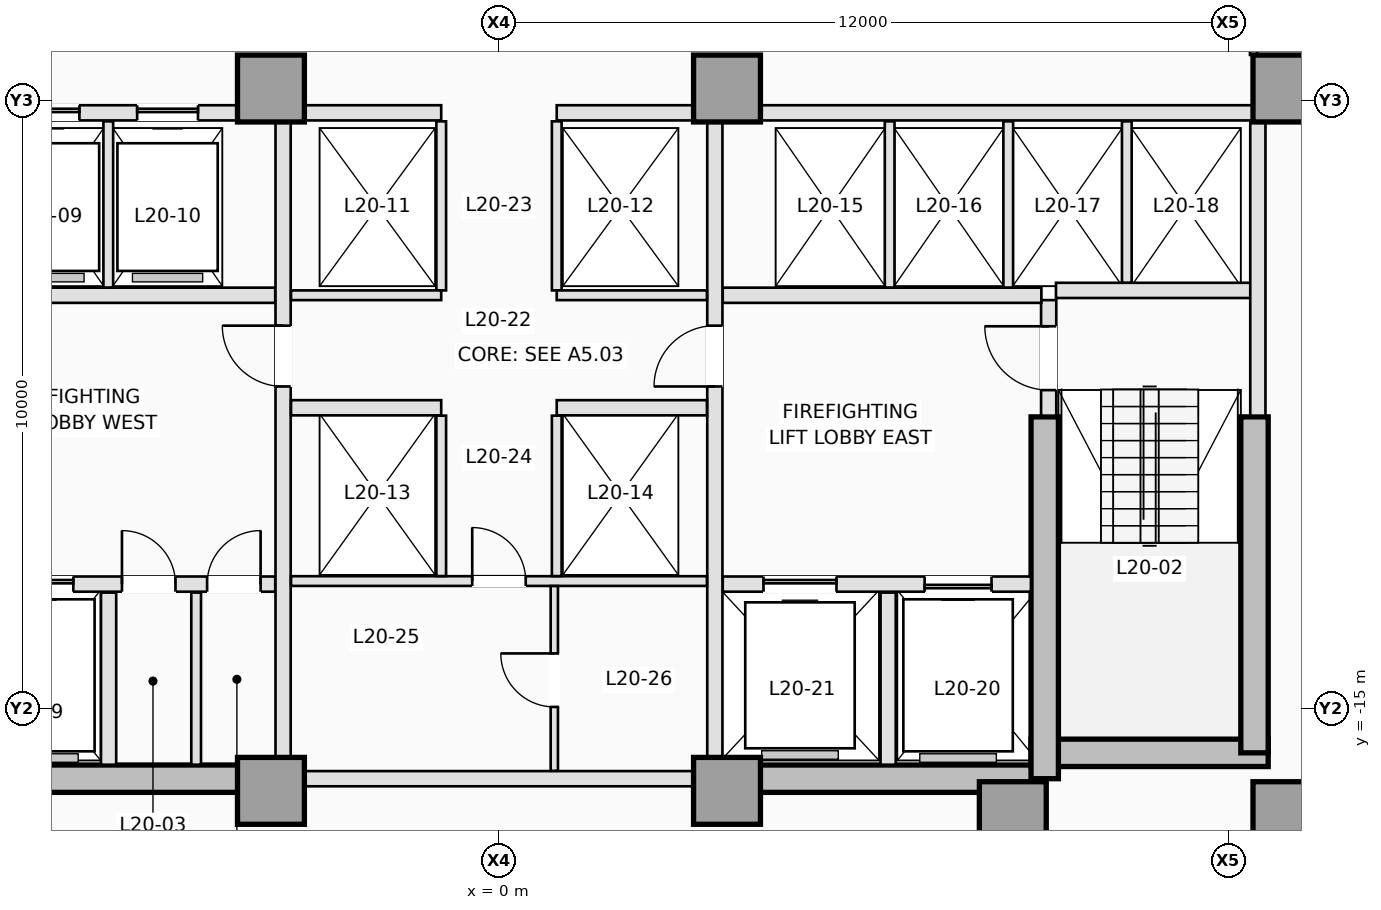
"""IFC4 building model, lengths in metres.
Left out: names, types, materials, properties, quantities, classifications, styles, units other than length and angle.
Written with IfcOpenShell. Run it as: python <this file> out.ifc"""

import sys

from ifc_helpers import new_model, si_unit, direction, frame, frame_2d, origin, origin_2d, place, context, subcontext, project, spatial, rectangle, extrude, element, fill, save


model = new_model("IFC4")
c1 = context("Model", 3, precision=1e-05, world=origin(), true_north=direction((0.0, 1.0)))
c2 = subcontext(c1, "Body", "Model", "MODEL_VIEW")
j1 = project(units=[si_unit("LENGTHUNIT", "METRE"), si_unit("PLANEANGLEUNIT", "RADIAN")], contexts=[c1])
p1 = place(None, origin())
s1 = spatial("IfcSite", under=j1, at=p1, CompositionType="ELEMENT")
p2 = place(p1, origin())
s2 = spatial("IfcBuilding", under=s1, at=p2, CompositionType="ELEMENT")
p3 = place(p2, frame((0.0, 0.0, 76.6)))
s3 = spatial("IfcBuildingStorey", under=s2, at=p3, CompositionType="ELEMENT", Elevation=76.6)
for number, where, z_axis, x_axis in (
    (1, (-8.975, -16.15, 0.0), (0.0, 0.0, 1.0), (1.0, 0.0, 0.0)),
    (2, (3.75, -16.15, 0.0), (0.0, 0.0, 1.0), (1.0, 0.0, 0.0)),
):
    element("IfcWall", number, at=place(p3, frame(where, z_axis=z_axis, x_axis=x_axis)), inside=s3, PredefinedType="SHEAR", context=c2, shape_type="SweptSolid", body=[
        extrude(rectangle(XDim=5.225, YDim=0.45, at=frame_2d((2.613, 0.0))), origin(), (0.0, 0.0, 1.0), 3.5),
    ])
p4 = place(p3, frame((8.75, -15.725, 0.0), z_axis=(0.0, 0.0, 1.0), x_axis=(1.0, 0.0, 0.0)))
e3 = element("IfcWall", 3, at=p4, inside=s3, PredefinedType="SHEAR", context=c2, shape_type="SweptSolid", body=[
    extrude(rectangle(XDim=3.9, YDim=0.45, at=frame_2d((1.95, 0.0))), origin(), (0.0, 0.0, 1.0), 3.5),
])
p5 = place(p3, frame((12.425, -15.725, 0.0), z_axis=(0.0, 0.0, 1.0), x_axis=(0.0, 1.0, 0.0)))
e4 = element("IfcWall", 4, at=p5, inside=s3, PredefinedType="SHEAR", context=c2, shape_type="SweptSolid", body=[
    extrude(rectangle(XDim=5.525, YDim=0.45, at=frame_2d((2.763, 0.0))), origin(), (0.0, 0.0, 1.0), 3.5),
])
p6 = place(p3, frame((8.975, -16.15, 0.0), z_axis=(0.0, 0.0, 1.0), x_axis=(0.0, 1.0, 0.0)))
e5 = element("IfcWall", 5, at=p6, inside=s3, PredefinedType="SHEAR", context=c2, shape_type="SweptSolid", body=[
    extrude(rectangle(XDim=5.95, YDim=0.45, at=frame_2d((2.975, 0.0))), origin(), (0.0, 0.0, 1.0), 3.5),
])
for number, where, z_axis, x_axis in (
    (6, (-3.75, -16.35, 0.0), (0.0, 0.0, 1.0), (1.0, 0.0, 0.0)),
    (7, (3.75, -16.35, 0.0), (0.0, 0.0, 1.0), (1.0, 0.0, 0.0)),
    (8, (8.45, -16.75, 0.0), (0.0, 0.0, 1.0), (1.0, 0.0, 0.0)),
    (9, (12.95, -16.75, 0.0), (0.0, 0.0, 1.0), (1.0, 0.0, 0.0)),
    (10, (-3.75, -4.8, 0.0), (0.0, 0.0, 1.0), (1.0, 0.0, 0.0)),
    (11, (3.75, -4.8, 0.0), (0.0, 0.0, 1.0), (1.0, 0.0, 0.0)),
    (12, (12.95, -4.8, 0.0), (0.0, 0.0, 1.0), (1.0, 0.0, 0.0)),
):
    element("IfcColumn", number, at=place(p3, frame(where, z_axis=z_axis, x_axis=x_axis)), inside=s3, PredefinedType="COLUMN", context=c2, shape_type="SweptSolid", body=[
        extrude(rectangle(XDim=1.1, YDim=1.1, at=origin_2d()), origin(), (0.0, 0.0, 1.0), 3.5),
    ])
p7 = place(p3, frame((9.04, -10.18, 0.0), z_axis=(0.0, 0.0, 1.0), x_axis=(0.0, 1.0, 0.0)))
e13 = element("IfcWall", 13, at=p7, inside=s3, PredefinedType="PARTITIONING", context=c2, shape_type="SweptSolid", body=[
    extrude(rectangle(XDim=1.9, YDim=0.25, at=frame_2d((0.95, 0.0))), origin(), (0.0, 0.0, 1.0), 3.25),
])
p8 = place(p7, frame((0.42, 0.0, 0.0)))
e14 = element("IfcOpeningElement", 14, at=p8, cuts=e13, PredefinedType="OPENING", context=c2, shape_type="SweptSolid", body=[
    extrude(rectangle(XDim=1.05, YDim=2.15, at=frame_2d((0.525, 1.075))), frame((0.0, 0.135, 0.0), z_axis=(0.0, -1.0, 0.0), x_axis=(1.0, 0.0, 0.0)), (0.0, 0.0, 1.0), 0.27),
])
p9 = place(p3, frame((9.16, -8.12, 0.0), z_axis=(0.0, 0.0, 1.0), x_axis=(1.0, 0.0, 0.0)))
e15 = element("IfcWall", 15, at=p9, inside=s3, PredefinedType="PARTITIONING", context=c2, shape_type="SweptSolid", body=[
    extrude(rectangle(XDim=3.22, YDim=0.25, at=frame_2d((1.61, 0.0))), origin(), (0.0, 0.0, 1.0), 3.25),
])
p10 = place(p3, frame((12.48, -10.18, 0.0), z_axis=(0.0, 0.0, 1.0), x_axis=(0.0, 1.0, 0.0)))
e16 = element("IfcWall", 16, at=p10, inside=s3, PredefinedType="PARTITIONING", context=c2, shape_type="SweptSolid", body=[
    extrude(rectangle(XDim=4.828, YDim=0.25, at=frame_2d((2.414, 0.0))), origin(), (0.0, 0.0, 1.0), 3.25),
])
p11 = place(p3, frame((-8.748, -12.95, 0.0), z_axis=(0.0, 0.0, 1.0), x_axis=(1.0, 0.0, 0.0)))
e17 = element("IfcWall", 17, at=p11, inside=s3, PredefinedType="PARTITIONING", context=c2, shape_type="SweptSolid", body=[
    extrude(rectangle(XDim=5.068, YDim=0.25, at=frame_2d((2.534, 0.0))), origin(), (0.0, 0.0, 1.0), 3.25),
])
p12 = place(p11, frame((0.648, 0.0, 0.0)))
e18 = element("IfcOpeningElement", 18, at=p12, cuts=e17, PredefinedType="OPENING", context=c2, shape_type="SweptSolid", body=[
    extrude(rectangle(XDim=1.1, YDim=2.15, at=frame_2d((0.55, 1.075))), frame((0.0, 0.135, 0.0), z_axis=(0.0, -1.0, 0.0), x_axis=(1.0, 0.0, 0.0)), (0.0, 0.0, 1.0), 0.27),
])
p13 = place(p11, frame((2.548, 0.0, 0.0)))
e19 = element("IfcOpeningElement", 19, at=p13, cuts=e17, PredefinedType="OPENING", context=c2, shape_type="SweptSolid", body=[
    extrude(rectangle(XDim=0.88, YDim=2.1, at=frame_2d((0.44, 1.05))), frame((0.0, 0.135, 0.0), z_axis=(0.0, -1.0, 0.0), x_axis=(1.0, 0.0, 0.0)), (0.0, 0.0, 1.0), 0.27),
])
p14 = place(p11, frame((3.948, 0.0, 0.0)))
e20 = element("IfcOpeningElement", 20, at=p14, cuts=e17, PredefinedType="OPENING", context=c2, shape_type="SweptSolid", body=[
    extrude(rectangle(XDim=0.88, YDim=2.1, at=frame_2d((0.44, 1.05))), frame((0.0, 0.135, 0.0), z_axis=(0.0, -1.0, 0.0), x_axis=(1.0, 0.0, 0.0)), (0.0, 0.0, 1.0), 0.27),
])
p15 = place(p3, frame((3.68, -12.95, 0.0), z_axis=(0.0, 0.0, 1.0), x_axis=(1.0, 0.0, 0.0)))
e21 = element("IfcWall", 21, at=p15, inside=s3, PredefinedType="PARTITIONING", context=c2, shape_type="SweptSolid", body=[
    extrude(rectangle(XDim=5.068, YDim=0.25, at=frame_2d((2.534, 0.0))), origin(), (0.0, 0.0, 1.0), 3.25),
])
p16 = place(p15, frame((3.32, 0.0, 0.0)))
e22 = element("IfcOpeningElement", 22, at=p16, cuts=e21, PredefinedType="OPENING", context=c2, shape_type="SweptSolid", body=[
    extrude(rectangle(XDim=1.1, YDim=2.15, at=frame_2d((0.55, 1.075))), frame((0.0, 0.135, 0.0), z_axis=(0.0, -1.0, 0.0), x_axis=(1.0, 0.0, 0.0)), (0.0, 0.0, 1.0), 0.27),
])
p17 = place(p15, frame((0.67, 0.0, 0.0)))
e23 = element("IfcOpeningElement", 23, at=p17, cuts=e21, PredefinedType="OPENING", context=c2, shape_type="SweptSolid", body=[
    extrude(rectangle(XDim=1.2, YDim=2.15, at=frame_2d((0.6, 1.075))), frame((0.0, 0.135, 0.0), z_axis=(0.0, -1.0, 0.0), x_axis=(1.0, 0.0, 0.0)), (0.0, 0.0, 1.0), 0.27),
])
p18 = place(p3, frame((-6.42, -15.92, 0.0), z_axis=(0.0, 0.0, 1.0), x_axis=(0.0, 1.0, 0.0)))
e24 = element("IfcWall", 24, at=p18, inside=s3, PredefinedType="PARTITIONING", context=c2, shape_type="SweptSolid", body=[
    extrude(rectangle(XDim=2.83, YDim=0.25, at=frame_2d((1.415, 0.0))), origin(), (0.0, 0.0, 1.0), 3.25),
])
p19 = place(p3, frame((-4.98, -15.92, 0.0), z_axis=(0.0, 0.0, 1.0), x_axis=(0.0, 1.0, 0.0)))
e25 = element("IfcWall", 25, at=p19, inside=s3, PredefinedType="PARTITIONING", context=c2, shape_type="SweptSolid", body=[
    extrude(rectangle(XDim=2.83, YDim=0.16, at=frame_2d((1.415, 0.0))), origin(), (0.0, 0.0, 1.0), 3.25),
])
p20 = place(p3, frame((6.4, -15.92, 0.0), z_axis=(0.0, 0.0, 1.0), x_axis=(0.0, 1.0, 0.0)))
e26 = element("IfcWall", 26, at=p20, inside=s3, PredefinedType="PARTITIONING", context=c2, shape_type="SweptSolid", body=[
    extrude(rectangle(XDim=2.83, YDim=0.25, at=frame_2d((1.415, 0.0))), origin(), (0.0, 0.0, 1.0), 3.25),
])
for number, where, z_axis, x_axis in (
    (27, (-8.92, -8.2, 0.0), (0.0, 0.0, 1.0), (1.0, 0.0, 0.0)),
    (28, (3.68, -8.2, 0.0), (0.0, 0.0, 1.0), (1.0, 0.0, 0.0)),
):
    element("IfcWall", number, at=place(p3, frame(where, z_axis=z_axis, x_axis=x_axis)), inside=s3, PredefinedType="PARTITIONING", context=c2, shape_type="SweptSolid", body=[
        extrude(rectangle(XDim=5.24, YDim=0.25, at=frame_2d((2.62, 0.0))), origin(), (0.0, 0.0, 1.0), 3.25),
    ])
p21 = place(p3, frame((-3.55, -15.798, 0.0), z_axis=(0.0, 0.0, 1.0), x_axis=(0.0, 1.0, 0.0)))
e29 = element("IfcWall", 29, at=p21, inside=s3, PredefinedType="PARTITIONING", context=c2, shape_type="SweptSolid", body=[
    extrude(rectangle(XDim=10.446, YDim=0.25, at=frame_2d((5.223, 0.0))), origin(), (0.0, 0.0, 1.0), 3.25),
])
p22 = place(p21, frame((6.098, 0.0, 0.0)))
e30 = element("IfcOpeningElement", 30, at=p22, cuts=e29, PredefinedType="OPENING", context=c2, shape_type="SweptSolid", body=[
    extrude(rectangle(XDim=1.0, YDim=2.15, at=frame_2d((0.5, 1.075))), frame((0.0, 0.135, 0.0), z_axis=(0.0, -1.0, 0.0), x_axis=(1.0, 0.0, 0.0)), (0.0, 0.0, 1.0), 0.27),
])
p23 = place(p3, frame((3.55, -15.798, 0.0), z_axis=(0.0, 0.0, 1.0), x_axis=(0.0, 1.0, 0.0)))
e31 = element("IfcWall", 31, at=p23, inside=s3, PredefinedType="PARTITIONING", context=c2, shape_type="SweptSolid", body=[
    extrude(rectangle(XDim=10.446, YDim=0.25, at=frame_2d((5.223, 0.0))), origin(), (0.0, 0.0, 1.0), 3.25),
])
p24 = place(p23, frame((6.098, 0.0, 0.0)))
e32 = element("IfcOpeningElement", 32, at=p24, cuts=e31, PredefinedType="OPENING", context=c2, shape_type="SweptSolid", body=[
    extrude(rectangle(XDim=1.0, YDim=2.15, at=frame_2d((0.5, 1.075))), frame((0.0, 0.135, 0.0), z_axis=(0.0, -1.0, 0.0), x_axis=(1.0, 0.0, 0.0)), (0.0, 0.0, 1.0), 0.27),
])
p25 = place(p3, frame((-12.398, -5.2, 0.0), z_axis=(0.0, 0.0, 1.0), x_axis=(1.0, 0.0, 0.0)))
e33 = element("IfcWall", 33, at=p25, inside=s3, PredefinedType="PARTITIONING", context=c2, shape_type="SweptSolid", body=[
    extrude(rectangle(XDim=8.096, YDim=0.25, at=frame_2d((4.048, 0.0))), origin(), (0.0, 0.0, 1.0), 3.25),
])
p26 = place(p25, frame((0.598, 0.0, 0.0)))
e34 = element("IfcOpeningElement", 34, at=p26, cuts=e33, PredefinedType="OPENING", context=c2, shape_type="SweptSolid", body=[
    extrude(rectangle(XDim=1.0, YDim=2.15, at=frame_2d((0.5, 1.075))), frame((0.0, 0.135, 0.0), z_axis=(0.0, -1.0, 0.0), x_axis=(1.0, 0.0, 0.0)), (0.0, 0.0, 1.0), 0.27),
])
p27 = place(p25, frame((2.548, 0.0, 0.0)))
e35 = element("IfcOpeningElement", 35, at=p27, cuts=e33, PredefinedType="OPENING", context=c2, shape_type="SweptSolid", body=[
    extrude(rectangle(XDim=1.0, YDim=2.15, at=frame_2d((0.5, 1.075))), frame((0.0, 0.135, 0.0), z_axis=(0.0, -1.0, 0.0), x_axis=(1.0, 0.0, 0.0)), (0.0, 0.0, 1.0), 0.27),
])
p28 = place(p25, frame((4.498, 0.0, 0.0)))
e36 = element("IfcOpeningElement", 36, at=p28, cuts=e33, PredefinedType="OPENING", context=c2, shape_type="SweptSolid", body=[
    extrude(rectangle(XDim=1.0, YDim=2.15, at=frame_2d((0.5, 1.075))), frame((0.0, 0.135, 0.0), z_axis=(0.0, -1.0, 0.0), x_axis=(1.0, 0.0, 0.0)), (0.0, 0.0, 1.0), 0.27),
])
p29 = place(p25, frame((6.448, 0.0, 0.0)))
e37 = element("IfcOpeningElement", 37, at=p29, cuts=e33, PredefinedType="OPENING", context=c2, shape_type="SweptSolid", body=[
    extrude(rectangle(XDim=1.0, YDim=2.15, at=frame_2d((0.5, 1.075))), frame((0.0, 0.135, 0.0), z_axis=(0.0, -1.0, 0.0), x_axis=(1.0, 0.0, 0.0)), (0.0, 0.0, 1.0), 0.27),
])
p30 = place(p3, frame((4.302, -5.2, 0.0), z_axis=(0.0, 0.0, 1.0), x_axis=(1.0, 0.0, 0.0)))
e38 = element("IfcWall", 38, at=p30, inside=s3, PredefinedType="PARTITIONING", context=c2, shape_type="SweptSolid", body=[
    extrude(rectangle(XDim=8.096, YDim=0.25, at=frame_2d((4.048, 0.0))), origin(), (0.0, 0.0, 1.0), 3.25),
])
for number, where, z_axis, x_axis in (
    (39, (-3.198, -5.2, 0.0), (0.0, 0.0, 1.0), (1.0, 0.0, 0.0)),
    (40, (0.95, -5.2, 0.0), (0.0, 0.0, 1.0), (1.0, 0.0, 0.0)),
):
    element("IfcWall", number, at=place(p3, frame(where, z_axis=z_axis, x_axis=x_axis)), inside=s3, PredefinedType="PARTITIONING", context=c2, shape_type="SweptSolid", body=[
        extrude(rectangle(XDim=2.248, YDim=0.25, at=frame_2d((1.124, 0.0))), origin(), (0.0, 0.0, 1.0), 3.25),
    ])
for number, where, z_axis, x_axis in (
    (41, (-6.425, -8.073, 0.0), (0.0, 0.0, 1.0), (0.0, 1.0, 0.0)),
    (42, (6.425, -8.073, 0.0), (0.0, 0.0, 1.0), (0.0, 1.0, 0.0)),
    (43, (8.375, -8.073, 0.0), (0.0, 0.0, 1.0), (0.0, 1.0, 0.0)),
):
    element("IfcWall", number, at=place(p3, frame(where, z_axis=z_axis, x_axis=x_axis)), inside=s3, PredefinedType="PARTITIONING", context=c2, shape_type="SweptSolid", body=[
        extrude(rectangle(XDim=2.733, YDim=0.16, at=frame_2d((1.366, 0.0))), origin(), (0.0, 0.0, 1.0), 3.25),
    ])
p31 = place(p3, frame((10.325, -7.993, 0.0), z_axis=(0.0, 0.0, 1.0), x_axis=(0.0, 1.0, 0.0)))
e44 = element("IfcWall", 44, at=p31, inside=s3, PredefinedType="PARTITIONING", context=c2, shape_type="SweptSolid", body=[
    extrude(rectangle(XDim=2.653, YDim=0.16, at=frame_2d((1.326, 0.0))), origin(), (0.0, 0.0, 1.0), 3.25),
])
p32 = place(p3, frame((-3.198, -16.15, 0.0), z_axis=(0.0, 0.0, 1.0), x_axis=(1.0, 0.0, 0.0)))
e45 = element("IfcWall", 45, at=p32, inside=s3, PredefinedType="PARTITIONING", context=c2, shape_type="SweptSolid", body=[
    extrude(rectangle(XDim=6.396, YDim=0.25, at=frame_2d((3.198, 0.0))), origin(), (0.0, 0.0, 1.0), 2.3),
])
for number, where, z_axis, x_axis in (
    (46, (-0.95, -8.12, 0.0), (0.0, 0.0, 1.0), (0.0, 1.0, 0.0)),
    (47, (0.95, -8.12, 0.0), (0.0, 0.0, 1.0), (0.0, 1.0, 0.0)),
):
    element("IfcWall", number, at=place(p3, frame(where, z_axis=z_axis, x_axis=x_axis)), inside=s3, PredefinedType="PARTITIONING", context=c2, shape_type="SweptSolid", body=[
        extrude(rectangle(XDim=2.78, YDim=0.16, at=frame_2d((1.39, 0.0))), origin(), (0.0, 0.0, 1.0), 3.25),
    ])
for number, where, z_axis, x_axis in (
    (48, (-3.42, -8.2, 0.0), (0.0, 0.0, 1.0), (1.0, 0.0, 0.0)),
    (49, (0.95, -8.2, 0.0), (0.0, 0.0, 1.0), (1.0, 0.0, 0.0)),
):
    element("IfcWall", number, at=place(p3, frame(where, z_axis=z_axis, x_axis=x_axis)), inside=s3, PredefinedType="PARTITIONING", context=c2, shape_type="SweptSolid", body=[
        extrude(rectangle(XDim=2.47, YDim=0.16, at=frame_2d((1.235, 0.0))), origin(), (0.0, 0.0, 1.0), 3.25),
    ])
for number, where, z_axis, x_axis in (
    (50, (-3.42, -10.05, 0.0), (0.0, 0.0, 1.0), (1.0, 0.0, 0.0)),
    (51, (0.95, -10.05, 0.0), (0.0, 0.0, 1.0), (1.0, 0.0, 0.0)),
):
    element("IfcWall", number, at=place(p3, frame(where, z_axis=z_axis, x_axis=x_axis)), inside=s3, PredefinedType="PARTITIONING", context=c2, shape_type="SweptSolid", body=[
        extrude(rectangle(XDim=2.47, YDim=0.25, at=frame_2d((1.235, 0.0))), origin(), (0.0, 0.0, 1.0), 3.25),
    ])
p33 = place(p3, frame((-3.42, -12.9, 0.0), z_axis=(0.0, 0.0, 1.0), x_axis=(1.0, 0.0, 0.0)))
e52 = element("IfcWall", 52, at=p33, inside=s3, PredefinedType="PARTITIONING", context=c2, shape_type="SweptSolid", body=[
    extrude(rectangle(XDim=6.84, YDim=0.16, at=frame_2d((3.42, 0.0))), origin(), (0.0, 0.0, 1.0), 3.25),
])
p34 = place(p33, frame((2.98, 0.0, 0.0)))
e53 = element("IfcOpeningElement", 53, at=p34, cuts=e52, PredefinedType="OPENING", context=c2, shape_type="SweptSolid", body=[
    extrude(rectangle(XDim=0.88, YDim=2.12, at=frame_2d((0.44, 1.06))), frame((0.0, 0.09, 0.0), z_axis=(0.0, -1.0, 0.0), x_axis=(1.0, 0.0, 0.0)), (0.0, 0.0, 1.0), 0.18),
])
for number, where, z_axis, x_axis in (
    (54, (-0.95, -12.818, 0.0), (0.0, 0.0, 1.0), (0.0, 1.0, 0.0)),
    (55, (0.95, -12.818, 0.0), (0.0, 0.0, 1.0), (0.0, 1.0, 0.0)),
):
    element("IfcWall", number, at=place(p3, frame(where, z_axis=z_axis, x_axis=x_axis)), inside=s3, PredefinedType="PARTITIONING", context=c2, shape_type="SweptSolid", body=[
        extrude(rectangle(XDim=2.638, YDim=0.16, at=frame_2d((1.319, 0.0))), origin(), (0.0, 0.0, 1.0), 3.25),
    ])
p35 = place(p3, frame((0.91, -16.02, 0.0), z_axis=(0.0, 0.0, 1.0), x_axis=(0.0, 1.0, 0.0)))
e56 = element("IfcWall", 56, at=p35, inside=s3, PredefinedType="PARTITIONING", context=c2, shape_type="SweptSolid", body=[
    extrude(rectangle(XDim=3.038, YDim=0.12, at=frame_2d((1.519, 0.0))), origin(), (0.0, 0.0, 1.0), 3.25),
])
p36 = place(p35, frame((1.05, 0.0, 0.0)))
e57 = element("IfcOpeningElement", 57, at=p36, cuts=e56, PredefinedType="OPENING", context=c2, shape_type="SweptSolid", body=[
    extrude(rectangle(XDim=0.88, YDim=2.12, at=frame_2d((0.44, 1.06))), frame((0.0, 0.07, 0.0), z_axis=(0.0, -1.0, 0.0), x_axis=(1.0, 0.0, 0.0)), (0.0, 0.0, 1.0), 0.14),
])
p37 = place(p3, frame((12.41, -2.462, 0.0), z_axis=(0.0, 0.0, 1.0), x_axis=(0.0, -1.0, 0.0)))
e58 = element("IfcWall", 58, at=p37, inside=s3, PredefinedType="PARTITIONING", context=c2, shape_type="SweptSolid", body=[
    extrude(rectangle(XDim=1.786, YDim=0.12, at=frame_2d((0.893, 0.0))), origin(), (0.0, 0.0, 1.0), 3.25),
])
p38 = place(p28, origin())
e59 = element("IfcDoor", 59, at=p38, inside=s3, OperationType="SLIDING_TO_LEFT", PredefinedType="DOOR", context=c2, shape_type="SweptSolid", body=[
    extrude(rectangle(XDim=1.0, YDim=2.15, at=frame_2d((0.5, 1.075))), frame((0.0, 0.025, 0.0), z_axis=(0.0, -1.0, 0.0), x_axis=(1.0, 0.0, 0.0)), (0.0, 0.0, 1.0), 0.05),
])
fill(e36, e59)
p39 = place(p29, origin())
e60 = element("IfcDoor", 60, at=p39, inside=s3, OperationType="SLIDING_TO_LEFT", PredefinedType="DOOR", context=c2, shape_type="SweptSolid", body=[
    extrude(rectangle(XDim=1.0, YDim=2.15, at=frame_2d((0.5, 1.075))), frame((0.0, 0.025, 0.0), z_axis=(0.0, -1.0, 0.0), x_axis=(1.0, 0.0, 0.0)), (0.0, 0.0, 1.0), 0.05),
])
fill(e37, e60)
p40 = place(p12, origin())
e61 = element("IfcDoor", 61, at=p40, inside=s3, OperationType="SLIDING_TO_LEFT", PredefinedType="DOOR", context=c2, shape_type="SweptSolid", body=[
    extrude(rectangle(XDim=1.1, YDim=2.15, at=frame_2d((0.55, 1.075))), frame((0.0, 0.025, 0.0), z_axis=(0.0, -1.0, 0.0), x_axis=(1.0, 0.0, 0.0)), (0.0, 0.0, 1.0), 0.05),
])
fill(e18, e61)
p41 = place(p16, origin())
e62 = element("IfcDoor", 62, at=p41, inside=s3, OperationType="SLIDING_TO_RIGHT", PredefinedType="DOOR", context=c2, shape_type="SweptSolid", body=[
    extrude(rectangle(XDim=1.1, YDim=2.15, at=frame_2d((0.55, 1.075))), frame((0.0, 0.025, 0.0), z_axis=(0.0, -1.0, 0.0), x_axis=(1.0, 0.0, 0.0)), (0.0, 0.0, 1.0), 0.05),
])
fill(e22, e62)
p42 = place(p17, origin())
e63 = element("IfcDoor", 63, at=p42, inside=s3, OperationType="SLIDING_TO_LEFT", PredefinedType="DOOR", context=c2, shape_type="SweptSolid", body=[
    extrude(rectangle(XDim=1.2, YDim=2.15, at=frame_2d((0.6, 1.075))), frame((0.0, 0.025, 0.0), z_axis=(0.0, -1.0, 0.0), x_axis=(1.0, 0.0, 0.0)), (0.0, 0.0, 1.0), 0.05),
])
fill(e23, e63)
p43 = place(p8, origin())
e64 = element("IfcDoor", 64, at=p43, inside=s3, OperationType="SINGLE_SWING_RIGHT", PredefinedType="DOOR", context=c2, shape_type="SweptSolid", body=[
    extrude(rectangle(XDim=1.05, YDim=2.15, at=frame_2d((0.525, 1.075))), frame((0.0, 0.025, 0.0), z_axis=(0.0, -1.0, 0.0), x_axis=(1.0, 0.0, 0.0)), (0.0, 0.0, 1.0), 0.05),
])
fill(e14, e64)
p44 = place(p13, origin())
e65 = element("IfcDoor", 65, at=p44, inside=s3, OperationType="SINGLE_SWING_LEFT", PredefinedType="TRAPDOOR", context=c2, shape_type="SweptSolid", body=[
    extrude(rectangle(XDim=0.88, YDim=2.1, at=frame_2d((0.44, 1.05))), frame((0.0, 0.025, 0.0), z_axis=(0.0, -1.0, 0.0), x_axis=(1.0, 0.0, 0.0)), (0.0, 0.0, 1.0), 0.05),
])
fill(e19, e65)
p45 = place(p14, origin())
e66 = element("IfcDoor", 66, at=p45, inside=s3, OperationType="SINGLE_SWING_RIGHT", PredefinedType="TRAPDOOR", context=c2, shape_type="SweptSolid", body=[
    extrude(rectangle(XDim=0.88, YDim=2.1, at=frame_2d((0.44, 1.05))), frame((0.0, 0.025, 0.0), z_axis=(0.0, -1.0, 0.0), x_axis=(1.0, 0.0, 0.0)), (0.0, 0.0, 1.0), 0.05),
])
fill(e20, e66)
p46 = place(p22, origin())
e67 = element("IfcDoor", 67, at=p46, inside=s3, OperationType="SINGLE_SWING_RIGHT", PredefinedType="DOOR", context=c2, shape_type="SweptSolid", body=[
    extrude(rectangle(XDim=1.0, YDim=2.15, at=frame_2d((0.5, 1.075))), frame((0.0, 0.025, 0.0), z_axis=(0.0, -1.0, 0.0), x_axis=(1.0, 0.0, 0.0)), (0.0, 0.0, 1.0), 0.05),
])
fill(e30, e67)
p47 = place(p24, origin())
e68 = element("IfcDoor", 68, at=p47, inside=s3, OperationType="SINGLE_SWING_LEFT", PredefinedType="DOOR", context=c2, shape_type="SweptSolid", body=[
    extrude(rectangle(XDim=1.0, YDim=2.15, at=frame_2d((0.5, 1.075))), frame((0.0, 0.025, 0.0), z_axis=(0.0, -1.0, 0.0), x_axis=(1.0, 0.0, 0.0)), (0.0, 0.0, 1.0), 0.05),
])
fill(e32, e68)
p48 = place(p34, origin())
e69 = element("IfcDoor", 69, at=p48, inside=s3, OperationType="SINGLE_SWING_LEFT", PredefinedType="DOOR", context=c2, shape_type="SweptSolid", body=[
    extrude(rectangle(XDim=0.88, YDim=2.12, at=frame_2d((0.44, 1.06))), frame((0.0, 0.025, 0.0), z_axis=(0.0, -1.0, 0.0), x_axis=(1.0, 0.0, 0.0)), (0.0, 0.0, 1.0), 0.05),
])
fill(e53, e69)
p49 = place(p36, origin())
e70 = element("IfcDoor", 70, at=p49, inside=s3, OperationType="SINGLE_SWING_RIGHT", PredefinedType="DOOR", context=c2, shape_type="SweptSolid", body=[
    extrude(rectangle(XDim=0.88, YDim=2.12, at=frame_2d((0.44, 1.06))), frame((0.0, 0.025, 0.0), z_axis=(0.0, -1.0, 0.0), x_axis=(1.0, 0.0, 0.0)), (0.0, 0.0, 1.0), 0.05),
])
fill(e57, e70)
save(model, sys.argv[1])
